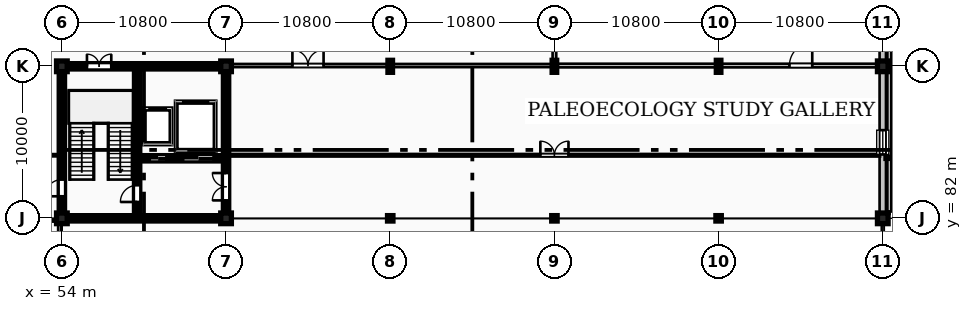
"""IFC4 building model, lengths in metres.
Left out: names, types, materials, properties, quantities, classifications, styles, units other than length and angle.
Written with IfcOpenShell. Run it as: python <this file> out.ifc"""

import sys

from ifc_helpers import new_model, si_unit, direction, frame, frame_2d, origin, origin_2d, place, context, subcontext, project, spatial, rectangle, hollow_circle, i_section, extrude, element, fill, save


model = new_model("IFC4")
c1 = context("Model", 3, precision=1e-05, world=origin(), true_north=direction((0.0, 1.0)))
c2 = subcontext(c1, "Body", "Model", "MODEL_VIEW")
j1 = project(units=[si_unit("LENGTHUNIT", "METRE"), si_unit("PLANEANGLEUNIT", "RADIAN")], contexts=[c1])
p1 = place(None, origin())
s1 = spatial("IfcSite", under=j1, at=p1, CompositionType="ELEMENT")
p2 = place(p1, origin())
s2 = spatial("IfcBuilding", under=s1, at=p2, CompositionType="ELEMENT")
p3 = place(p2, origin())
s3 = spatial("IfcBuildingStorey", under=s2, at=p3, CompositionType="ELEMENT", Elevation=0.0)
for number, where, z_axis, x_axis in (
    (1, (54.0, 82.0, 0.0), (0.0, 0.0, 1.0), (1.0, 0.0, 0.0)),
    (2, (54.0, 92.0, 0.0), (0.0, 0.0, 1.0), (1.0, 0.0, 0.0)),
    (3, (64.8, 82.0, 0.0), (0.0, 0.0, 1.0), (1.0, 0.0, 0.0)),
    (4, (64.8, 92.0, 0.0), (0.0, 0.0, 1.0), (1.0, 0.0, 0.0)),
):
    element("IfcColumn", number, at=place(p3, frame(where, z_axis=z_axis, x_axis=x_axis)), inside=s3, PredefinedType="COLUMN", context=c2, shape_type="SweptSolid", body=[
        extrude(rectangle(XDim=0.7, YDim=0.7, at=origin_2d()), origin(), (0.0, 0.0, 1.0), 4.8),
    ])
p4 = place(p3, frame((75.6, 82.0, 0.0), z_axis=(0.0, 0.0, 1.0), x_axis=(1.0, 0.0, 0.0)))
e5 = element("IfcColumn", 5, at=p4, inside=s3, PredefinedType="COLUMN", context=c2, shape_type="SweptSolid", body=[
    extrude(hollow_circle(Radius=0.178, WallThickness=0.016, at=origin_2d()), origin(), (0.0, 0.0, 1.0), 4.8),
])
p5 = place(p3, frame((75.6, 92.0, 0.0), z_axis=(0.0, 0.0, 1.0), x_axis=(1.0, 0.0, 0.0)))
e6 = element("IfcColumn", 6, at=p5, inside=s3, PredefinedType="COLUMN", context=c2, shape_type="SweptSolid", body=[
    extrude(i_section(OverallWidth=0.3, OverallDepth=0.79, WebThickness=0.015, FlangeThickness=0.028, FilletRadius=0.03, at=origin_2d()), origin(), (0.0, 0.0, 1.0), 4.8),
])
p6 = place(p3, frame((86.4, 82.0, 0.0), z_axis=(0.0, 0.0, 1.0), x_axis=(1.0, 0.0, 0.0)))
e7 = element("IfcColumn", 7, at=p6, inside=s3, PredefinedType="COLUMN", context=c2, shape_type="SweptSolid", body=[
    extrude(hollow_circle(Radius=0.178, WallThickness=0.016, at=origin_2d()), origin(), (0.0, 0.0, 1.0), 4.8),
])
p7 = place(p3, frame((86.4, 92.0, 0.0), z_axis=(0.0, 0.0, 1.0), x_axis=(1.0, 0.0, 0.0)))
e8 = element("IfcColumn", 8, at=p7, inside=s3, PredefinedType="COLUMN", context=c2, shape_type="SweptSolid", body=[
    extrude(i_section(OverallWidth=0.3, OverallDepth=0.79, WebThickness=0.015, FlangeThickness=0.028, FilletRadius=0.03, at=origin_2d()), origin(), (0.0, 0.0, 1.0), 4.8),
])
p8 = place(p3, frame((97.2, 82.0, 0.0), z_axis=(0.0, 0.0, 1.0), x_axis=(1.0, 0.0, 0.0)))
e9 = element("IfcColumn", 9, at=p8, inside=s3, PredefinedType="COLUMN", context=c2, shape_type="SweptSolid", body=[
    extrude(hollow_circle(Radius=0.178, WallThickness=0.016, at=origin_2d()), origin(), (0.0, 0.0, 1.0), 4.8),
])
p9 = place(p3, frame((97.2, 92.0, 0.0), z_axis=(0.0, 0.0, 1.0), x_axis=(1.0, 0.0, 0.0)))
e10 = element("IfcColumn", 10, at=p9, inside=s3, PredefinedType="COLUMN", context=c2, shape_type="SweptSolid", body=[
    extrude(i_section(OverallWidth=0.3, OverallDepth=0.79, WebThickness=0.015, FlangeThickness=0.028, FilletRadius=0.03, at=origin_2d()), origin(), (0.0, 0.0, 1.0), 4.8),
])
for number, where, z_axis, x_axis in (
    (11, (108.0, 82.0, 0.0), (0.0, 0.0, 1.0), (1.0, 0.0, 0.0)),
    (12, (108.0, 92.0, 0.0), (0.0, 0.0, 1.0), (1.0, 0.0, 0.0)),
):
    element("IfcColumn", number, at=place(p3, frame(where, z_axis=z_axis, x_axis=x_axis)), inside=s3, PredefinedType="COLUMN", context=c2, shape_type="SweptSolid", body=[
        extrude(rectangle(XDim=0.7, YDim=0.7, at=origin_2d()), origin(), (0.0, 0.0, 1.0), 4.8),
    ])
p10 = place(p3, frame((108.43, 82.45, -1.38), z_axis=(0.0, 0.0, 1.0), x_axis=(0.0, 1.0, 0.0)))
e13 = element("IfcWall", 13, at=p10, inside=s3, PredefinedType="PARAPET", context=c2, shape_type="SweptSolid", body=[
    extrude(rectangle(XDim=29.1, YDim=0.26, at=frame_2d((14.55, 0.0))), origin(), (0.0, 0.0, 1.0), 5.92),
])
p11 = place(p3, frame((108.0, 81.63, 0.0), z_axis=(0.0, 0.0, 1.0), x_axis=(0.0, 1.0, 0.0)))
e14 = element("IfcWall", 14, at=p11, inside=s3, PredefinedType="STANDARD", context=c2, shape_type="SweptSolid", body=[
    extrude(rectangle(XDim=0.225, YDim=0.3, at=frame_2d((0.113, 0.0))), origin(), (0.0, 0.0, 1.0), 4.56),
])
p12 = place(p3, frame((108.0, 82.145, 0.0), z_axis=(0.0, 0.0, 1.0), x_axis=(0.0, 1.0, 0.0)))
e15 = element("IfcWall", 15, at=p12, inside=s3, PredefinedType="STANDARD", context=c2, shape_type="SweptSolid", body=[
    extrude(rectangle(XDim=9.71, YDim=0.42, at=frame_2d((4.855, 0.0))), origin(), (0.0, 0.0, 1.0), 4.009),
])
p13 = place(p12, frame((4.055, 0.0, 1.2)))
e16 = element("IfcOpeningElement", 16, at=p13, cuts=e15, PredefinedType="OPENING", context=c2, shape_type="SweptSolid", body=[
    extrude(rectangle(XDim=1.6, YDim=1.8, at=frame_2d((0.8, 0.9))), frame((0.0, 0.22, 0.0), z_axis=(0.0, -1.0, 0.0), x_axis=(1.0, 0.0, 0.0)), (0.0, 0.0, 1.0), 0.44),
])
p14 = place(p3, frame((108.0, 92.145, 0.0), z_axis=(0.0, 0.0, 1.0), x_axis=(0.0, 1.0, 0.0)))
e17 = element("IfcWall", 17, at=p14, inside=s3, PredefinedType="STANDARD", context=c2, shape_type="SweptSolid", body=[
    extrude(rectangle(XDim=9.71, YDim=0.42, at=frame_2d((4.855, 0.0))), origin(), (0.0, 0.0, 1.0), 4.009),
])
p15 = place(p14, frame((4.055, 0.0, 1.2)))
e18 = element("IfcOpeningElement", 18, at=p15, cuts=e17, PredefinedType="OPENING", context=c2, shape_type="SweptSolid", body=[
    extrude(rectangle(XDim=1.6, YDim=1.8, at=frame_2d((0.8, 0.9))), frame((0.0, 0.22, 0.0), z_axis=(0.0, -1.0, 0.0), x_axis=(1.0, 0.0, 0.0)), (0.0, 0.0, 1.0), 0.44),
])
p16 = place(p3, frame((54.35, 82.0, 0.0), z_axis=(0.0, 0.0, 1.0), x_axis=(1.0, 0.0, 0.0)))
e19 = element("IfcWall", 19, at=p16, inside=s3, PredefinedType="SHEAR", context=c2, shape_type="SweptSolid", body=[
    extrude(rectangle(XDim=10.1, YDim=0.35, at=frame_2d((5.05, 0.0))), origin(), (0.0, 0.0, 1.0), 4.56),
])
p17 = place(p3, frame((54.35, 92.0, 0.0), z_axis=(0.0, 0.0, 1.0), x_axis=(1.0, 0.0, 0.0)))
e20 = element("IfcWall", 20, at=p17, inside=s3, PredefinedType="SHEAR", context=c2, shape_type="SweptSolid", body=[
    extrude(rectangle(XDim=10.1, YDim=0.35, at=frame_2d((5.05, 0.0))), origin(), (0.0, 0.0, 1.0), 4.56),
])
p18 = place(p17, frame((1.3, 0.0, 0.0)))
e21 = element("IfcOpeningElement", 21, at=p18, cuts=e20, PredefinedType="OPENING", context=c2, shape_type="SweptSolid", body=[
    extrude(rectangle(XDim=1.6, YDim=2.2, at=frame_2d((0.8, 1.1))), frame((0.0, 0.185, 0.0), z_axis=(0.0, -1.0, 0.0), x_axis=(1.0, 0.0, 0.0)), (0.0, 0.0, 1.0), 0.37),
])
p19 = place(p3, frame((54.0, 82.35, 0.0), z_axis=(0.0, 0.0, 1.0), x_axis=(0.0, 1.0, 0.0)))
e22 = element("IfcWall", 22, at=p19, inside=s3, PredefinedType="SHEAR", context=c2, shape_type="SweptSolid", body=[
    extrude(rectangle(XDim=9.3, YDim=0.35, at=frame_2d((4.65, 0.0))), origin(), (0.0, 0.0, 1.0), 4.56),
])
p20 = place(p19, frame((1.1, 0.0, 0.0)))
e23 = element("IfcOpeningElement", 23, at=p20, cuts=e22, PredefinedType="OPENING", context=c2, shape_type="SweptSolid", body=[
    extrude(rectangle(XDim=1.1, YDim=2.2, at=frame_2d((0.55, 1.1))), frame((0.0, 0.185, 0.0), z_axis=(0.0, -1.0, 0.0), x_axis=(1.0, 0.0, 0.0)), (0.0, 0.0, 1.0), 0.37),
])
p21 = place(p3, frame((64.8, 82.35, 0.0), z_axis=(0.0, 0.0, 1.0), x_axis=(0.0, 1.0, 0.0)))
e24 = element("IfcWall", 24, at=p21, inside=s3, PredefinedType="SHEAR", context=c2, shape_type="SweptSolid", body=[
    extrude(rectangle(XDim=9.3, YDim=0.35, at=frame_2d((4.65, 0.0))), origin(), (0.0, 0.0, 1.0), 4.56),
])
p22 = place(p21, frame((0.83, 0.0, 0.0)))
e25 = element("IfcOpeningElement", 25, at=p22, cuts=e24, PredefinedType="OPENING", context=c2, shape_type="SweptSolid", body=[
    extrude(rectangle(XDim=1.8, YDim=2.25, at=frame_2d((0.9, 1.125))), frame((0.0, 0.185, 0.0), z_axis=(0.0, -1.0, 0.0), x_axis=(1.0, 0.0, 0.0)), (0.0, 0.0, 1.0), 0.37),
])
p23 = place(p3, frame((58.95, 82.175, 0.0), z_axis=(0.0, 0.0, 1.0), x_axis=(0.0, 1.0, 0.0)))
e26 = element("IfcWall", 26, at=p23, inside=s3, PredefinedType="SHEAR", context=c2, shape_type="SweptSolid", body=[
    extrude(rectangle(XDim=9.65, YDim=0.35, at=frame_2d((4.825, 0.0))), origin(), (0.0, 0.0, 1.0), 4.56),
])
p24 = place(p23, frame((0.9, 0.0, 0.0)))
e27 = element("IfcOpeningElement", 27, at=p24, cuts=e26, PredefinedType="OPENING", context=c2, shape_type="SweptSolid", body=[
    extrude(rectangle(XDim=1.1, YDim=2.2, at=frame_2d((0.55, 1.1))), frame((0.0, 0.185, 0.0), z_axis=(0.0, -1.0, 0.0), x_axis=(1.0, 0.0, 0.0)), (0.0, 0.0, 1.0), 0.37),
])
p25 = place(p3, frame((59.13, 85.95, 0.0), z_axis=(0.0, 0.0, 1.0), x_axis=(1.0, 0.0, 0.0)))
e28 = element("IfcWall", 28, at=p25, inside=s3, PredefinedType="SHEAR", context=c2, shape_type="SweptSolid", body=[
    extrude(rectangle(XDim=5.49, YDim=0.35, at=frame_2d((2.745, 0.0))), origin(), (0.0, 0.0, 1.0), 4.56),
])
p26 = place(p25, frame((0.65, 0.0, 0.0)))
e29 = element("IfcOpeningElement", 29, at=p26, cuts=e28, PredefinedType="OPENING", context=c2, shape_type="SweptSolid", body=[
    extrude(rectangle(XDim=1.1, YDim=2.2, at=frame_2d((0.55, 1.1))), frame((0.0, 0.185, 0.0), z_axis=(0.0, -1.0, 0.0), x_axis=(1.0, 0.0, 0.0)), (0.0, 0.0, 1.0), 0.37),
])
p27 = place(p25, frame((2.85, 0.0, 0.0)))
e30 = element("IfcOpeningElement", 30, at=p27, cuts=e28, PredefinedType="OPENING", context=c2, shape_type="SweptSolid", body=[
    extrude(rectangle(XDim=2.0, YDim=2.5, at=frame_2d((1.0, 1.25))), frame((0.0, 0.185, 0.0), z_axis=(0.0, -1.0, 0.0), x_axis=(1.0, 0.0, 0.0)), (0.0, 0.0, 1.0), 0.37),
])
p28 = place(p3, frame((43.38, 81.85, 0.0), z_axis=(0.0, 0.0, 1.0), x_axis=(1.0, 0.0, 0.0)))
e31 = element("IfcWall", 31, at=p28, inside=s3, PredefinedType="PARTITIONING", context=c2, shape_type="SweptSolid", body=[
    extrude(rectangle(XDim=10.44, YDim=0.13, at=frame_2d((5.22, 0.0))), origin(), (0.0, 0.0, 1.0), 3.989),
])
p29 = place(p28, frame((4.395, 0.0, 0.0)))
e32 = element("IfcOpeningElement", 32, at=p29, cuts=e31, PredefinedType="OPENING", context=c2, shape_type="SweptSolid", body=[
    extrude(rectangle(XDim=1.65, YDim=2.4, at=frame_2d((0.825, 1.2))), frame((0.0, 0.075, 0.0), z_axis=(0.0, -1.0, 0.0), x_axis=(1.0, 0.0, 0.0)), (0.0, 0.0, 1.0), 0.15),
])
p30 = place(p3, frame((25.6, 86.15, 0.0), z_axis=(0.0, 0.0, 1.0), x_axis=(1.0, 0.0, 0.0)))
e33 = element("IfcWall", 33, at=p30, inside=s3, PredefinedType="PARTITIONING", context=c2, shape_type="SweptSolid", body=[
    extrude(rectangle(XDim=28.22, YDim=0.15, at=frame_2d((14.11, 0.0))), origin(), (0.0, 0.0, 1.0), 4.52),
])
p31 = place(p30, frame((13.235, 0.0, 0.0)))
e34 = element("IfcOpeningElement", 34, at=p31, cuts=e33, PredefinedType="OPENING", context=c2, shape_type="SweptSolid", body=[
    extrude(rectangle(XDim=1.75, YDim=2.45, at=frame_2d((0.875, 1.225))), frame((0.0, 0.085, 0.0), z_axis=(0.0, -1.0, 0.0), x_axis=(1.0, 0.0, 0.0)), (0.0, 0.0, 1.0), 0.17),
])
p32 = place(p3, frame((64.98, 86.15, 0.0), z_axis=(0.0, 0.0, 1.0), x_axis=(1.0, 0.0, 0.0)))
e35 = element("IfcWall", 35, at=p32, inside=s3, PredefinedType="PARTITIONING", context=c2, shape_type="SweptSolid", body=[
    extrude(rectangle(XDim=42.84, YDim=0.17, at=frame_2d((21.42, 0.0))), origin(), (0.0, 0.0, 1.0), 4.52),
])
p33 = place(p32, frame((20.495, 0.0, 0.0)))
e36 = element("IfcOpeningElement", 36, at=p33, cuts=e35, PredefinedType="OPENING", context=c2, shape_type="SweptSolid", body=[
    extrude(rectangle(XDim=1.85, YDim=2.45, at=frame_2d((0.925, 1.225))), frame((0.0, 0.095, 0.0), z_axis=(0.0, -1.0, 0.0), x_axis=(1.0, 0.0, 0.0)), (0.0, 0.0, 1.0), 0.19),
])
p34 = place(p3, frame((64.98, 92.05, 0.0), z_axis=(0.0, 0.0, 1.0), x_axis=(1.0, 0.0, 0.0)))
e37 = element("IfcWall", 37, at=p34, inside=s3, PredefinedType="PARTITIONING", context=c2, shape_type="SweptSolid", body=[
    extrude(rectangle(XDim=10.42, YDim=0.21, at=frame_2d((5.21, 0.0))), origin(), (0.0, 0.0, 1.0), 4.069),
])
p35 = place(p34, frame((4.185, 0.0, 0.0)))
e38 = element("IfcOpeningElement", 38, at=p35, cuts=e37, PredefinedType="OPENING", context=c2, shape_type="SweptSolid", body=[
    extrude(rectangle(XDim=2.05, YDim=2.55, at=frame_2d((1.025, 1.275))), frame((0.0, 0.115, 0.0), z_axis=(0.0, -1.0, 0.0), x_axis=(1.0, 0.0, 0.0)), (0.0, 0.0, 1.0), 0.23),
])
p36 = place(p3, frame((75.8, 92.05, 0.0), z_axis=(0.0, 0.0, 1.0), x_axis=(1.0, 0.0, 0.0)))
e39 = element("IfcWall", 39, at=p36, inside=s3, PredefinedType="PARTITIONING", context=c2, shape_type="SweptSolid", body=[
    extrude(rectangle(XDim=10.4, YDim=0.21, at=frame_2d((5.2, 0.0))), origin(), (0.0, 0.0, 1.0), 4.069),
])
p37 = place(p3, frame((86.6, 92.05, 0.0), z_axis=(0.0, 0.0, 1.0), x_axis=(1.0, 0.0, 0.0)))
e40 = element("IfcWall", 40, at=p37, inside=s3, PredefinedType="SOLIDWALL", context=c2, shape_type="SweptSolid", body=[
    extrude(rectangle(XDim=10.4, YDim=0.24, at=frame_2d((5.2, 0.0))), origin(), (0.0, 0.0, 1.0), 4.069),
])
p38 = place(p3, frame((97.4, 92.05, 0.0), z_axis=(0.0, 0.0, 1.0), x_axis=(1.0, 0.0, 0.0)))
e41 = element("IfcWall", 41, at=p38, inside=s3, PredefinedType="SOLIDWALL", context=c2, shape_type="SweptSolid", body=[
    extrude(rectangle(XDim=10.42, YDim=0.24, at=frame_2d((5.21, 0.0))), origin(), (0.0, 0.0, 1.0), 4.069),
])
p39 = place(p38, frame((4.46, 0.0, 0.0)))
e42 = element("IfcOpeningElement", 42, at=p39, cuts=e41, PredefinedType="OPENING", context=c2, shape_type="SweptSolid", body=[
    extrude(rectangle(XDim=1.5, YDim=2.3, at=frame_2d((0.75, 1.15))), frame((0.0, 0.13, 0.0), z_axis=(0.0, -1.0, 0.0), x_axis=(1.0, 0.0, 0.0)), (0.0, 0.0, 1.0), 0.26),
])
p40 = place(p3, frame((53.86, 72.2, 0.0), z_axis=(0.0, 0.0, 1.0), x_axis=(0.0, 1.0, 0.0)))
e43 = element("IfcWall", 43, at=p40, inside=s3, PredefinedType="PARTITIONING", context=c2, shape_type="SweptSolid", body=[
    extrude(rectangle(XDim=9.62, YDim=0.21, at=frame_2d((4.81, 0.0))), origin(), (0.0, 0.0, 1.0), 4.52),
])
p41 = place(p3, frame((86.4, 92.18, 0.0), z_axis=(0.0, 0.0, 1.0), x_axis=(0.0, 1.0, 0.0)))
e44 = element("IfcWall", 44, at=p41, inside=s3, PredefinedType="SOLIDWALL", context=c2, shape_type="SweptSolid", body=[
    extrude(rectangle(XDim=9.62, YDim=0.24, at=frame_2d((4.81, 0.0))), origin(), (0.0, 0.0, 1.0), 4.06),
])
p42 = place(p13, origin())
e45 = element("IfcWindow", 45, at=p42, inside=s3, PartitioningType="SINGLE_PANEL", PredefinedType="WINDOW", context=c2, shape_type="SweptSolid", body=[
    extrude(rectangle(XDim=1.6, YDim=1.8, at=frame_2d((0.8, 0.9))), frame((0.0, 0.03, 0.0), z_axis=(0.0, -1.0, 0.0), x_axis=(1.0, 0.0, 0.0)), (0.0, 0.0, 1.0), 0.06),
])
fill(e16, e45)
p43 = place(p24, origin())
e46 = element("IfcDoor", 46, at=p43, inside=s3, OperationType="SINGLE_SWING_LEFT", PredefinedType="DOOR", context=c2, shape_type="SweptSolid", body=[
    extrude(rectangle(XDim=1.1, YDim=2.2, at=frame_2d((0.55, 1.1))), frame((0.0, 0.025, 0.0), z_axis=(0.0, -1.0, 0.0), x_axis=(1.0, 0.0, 0.0)), (0.0, 0.0, 1.0), 0.05),
])
fill(e27, e46)
p44 = place(p22, origin())
e47 = element("IfcDoor", 47, at=p44, inside=s3, OperationType="DOUBLE_DOOR_SINGLE_SWING", PredefinedType="DOOR", context=c2, shape_type="SweptSolid", body=[
    extrude(rectangle(XDim=1.8, YDim=2.25, at=frame_2d((0.9, 1.125))), frame((0.0, 0.025, 0.0), z_axis=(0.0, -1.0, 0.0), x_axis=(1.0, 0.0, 0.0)), (0.0, 0.0, 1.0), 0.05),
])
fill(e25, e47)
p45 = place(p18, origin())
e48 = element("IfcDoor", 48, at=p45, inside=s3, OperationType="DOUBLE_DOOR_SINGLE_SWING", PredefinedType="DOOR", context=c2, shape_type="SweptSolid", body=[
    extrude(rectangle(XDim=1.6, YDim=2.2, at=frame_2d((0.8, 1.1))), frame((0.0, 0.025, 0.0), z_axis=(0.0, -1.0, 0.0), x_axis=(1.0, 0.0, 0.0)), (0.0, 0.0, 1.0), 0.05),
])
fill(e21, e48)
p46 = place(p26, origin())
e49 = element("IfcDoor", 49, at=p46, inside=s3, OperationType="DOUBLE_DOOR_SLIDING", PredefinedType="DOOR", context=c2, shape_type="SweptSolid", body=[
    extrude(rectangle(XDim=1.1, YDim=2.2, at=frame_2d((0.55, 1.1))), frame((0.0, 0.025, 0.0), z_axis=(0.0, -1.0, 0.0), x_axis=(1.0, 0.0, 0.0)), (0.0, 0.0, 1.0), 0.05),
])
fill(e29, e49)
p47 = place(p27, origin())
e50 = element("IfcDoor", 50, at=p47, inside=s3, OperationType="DOUBLE_DOOR_SLIDING", PredefinedType="DOOR", context=c2, shape_type="SweptSolid", body=[
    extrude(rectangle(XDim=2.0, YDim=2.5, at=frame_2d((1.0, 1.25))), frame((0.0, 0.025, 0.0), z_axis=(0.0, -1.0, 0.0), x_axis=(1.0, 0.0, 0.0)), (0.0, 0.0, 1.0), 0.05),
])
fill(e30, e50)
p48 = place(p33, origin())
e51 = element("IfcDoor", 51, at=p48, inside=s3, OperationType="DOUBLE_DOOR_SINGLE_SWING", PredefinedType="DOOR", context=c2, shape_type="SweptSolid", body=[
    extrude(rectangle(XDim=1.85, YDim=2.45, at=frame_2d((0.925, 1.225))), frame((0.0, 0.025, 0.0), z_axis=(0.0, -1.0, 0.0), x_axis=(1.0, 0.0, 0.0)), (0.0, 0.0, 1.0), 0.05),
])
fill(e36, e51)
p49 = place(p35, origin())
e52 = element("IfcDoor", 52, at=p49, inside=s3, OperationType="DOUBLE_DOOR_SINGLE_SWING", PredefinedType="DOOR", context=c2, shape_type="SweptSolid", body=[
    extrude(rectangle(XDim=2.05, YDim=2.55, at=frame_2d((1.025, 1.275))), frame((0.0, 0.025, 0.0), z_axis=(0.0, -1.0, 0.0), x_axis=(1.0, 0.0, 0.0)), (0.0, 0.0, 1.0), 0.05),
])
fill(e38, e52)
p50 = place(p39, origin())
e53 = element("IfcDoor", 53, at=p50, inside=s3, OperationType="SINGLE_SWING_RIGHT", PredefinedType="DOOR", context=c2, shape_type="SweptSolid", body=[
    extrude(rectangle(XDim=1.5, YDim=2.3, at=frame_2d((0.75, 1.15))), frame((0.0, 0.025, 0.0), z_axis=(0.0, -1.0, 0.0), x_axis=(1.0, 0.0, 0.0)), (0.0, 0.0, 1.0), 0.05),
])
fill(e42, e53)
p51 = place(p20, origin())
e54 = element("IfcDoor", 54, at=p51, inside=s3, OperationType="SINGLE_SWING_LEFT", PredefinedType="DOOR", context=c2, shape_type="SweptSolid", body=[
    extrude(rectangle(XDim=1.1, YDim=2.2, at=frame_2d((0.55, 1.1))), frame((0.0, 0.025, 0.0), z_axis=(0.0, -1.0, 0.0), x_axis=(1.0, 0.0, 0.0)), (0.0, 0.0, 1.0), 0.05),
])
fill(e23, e54)
save(model, sys.argv[1])
